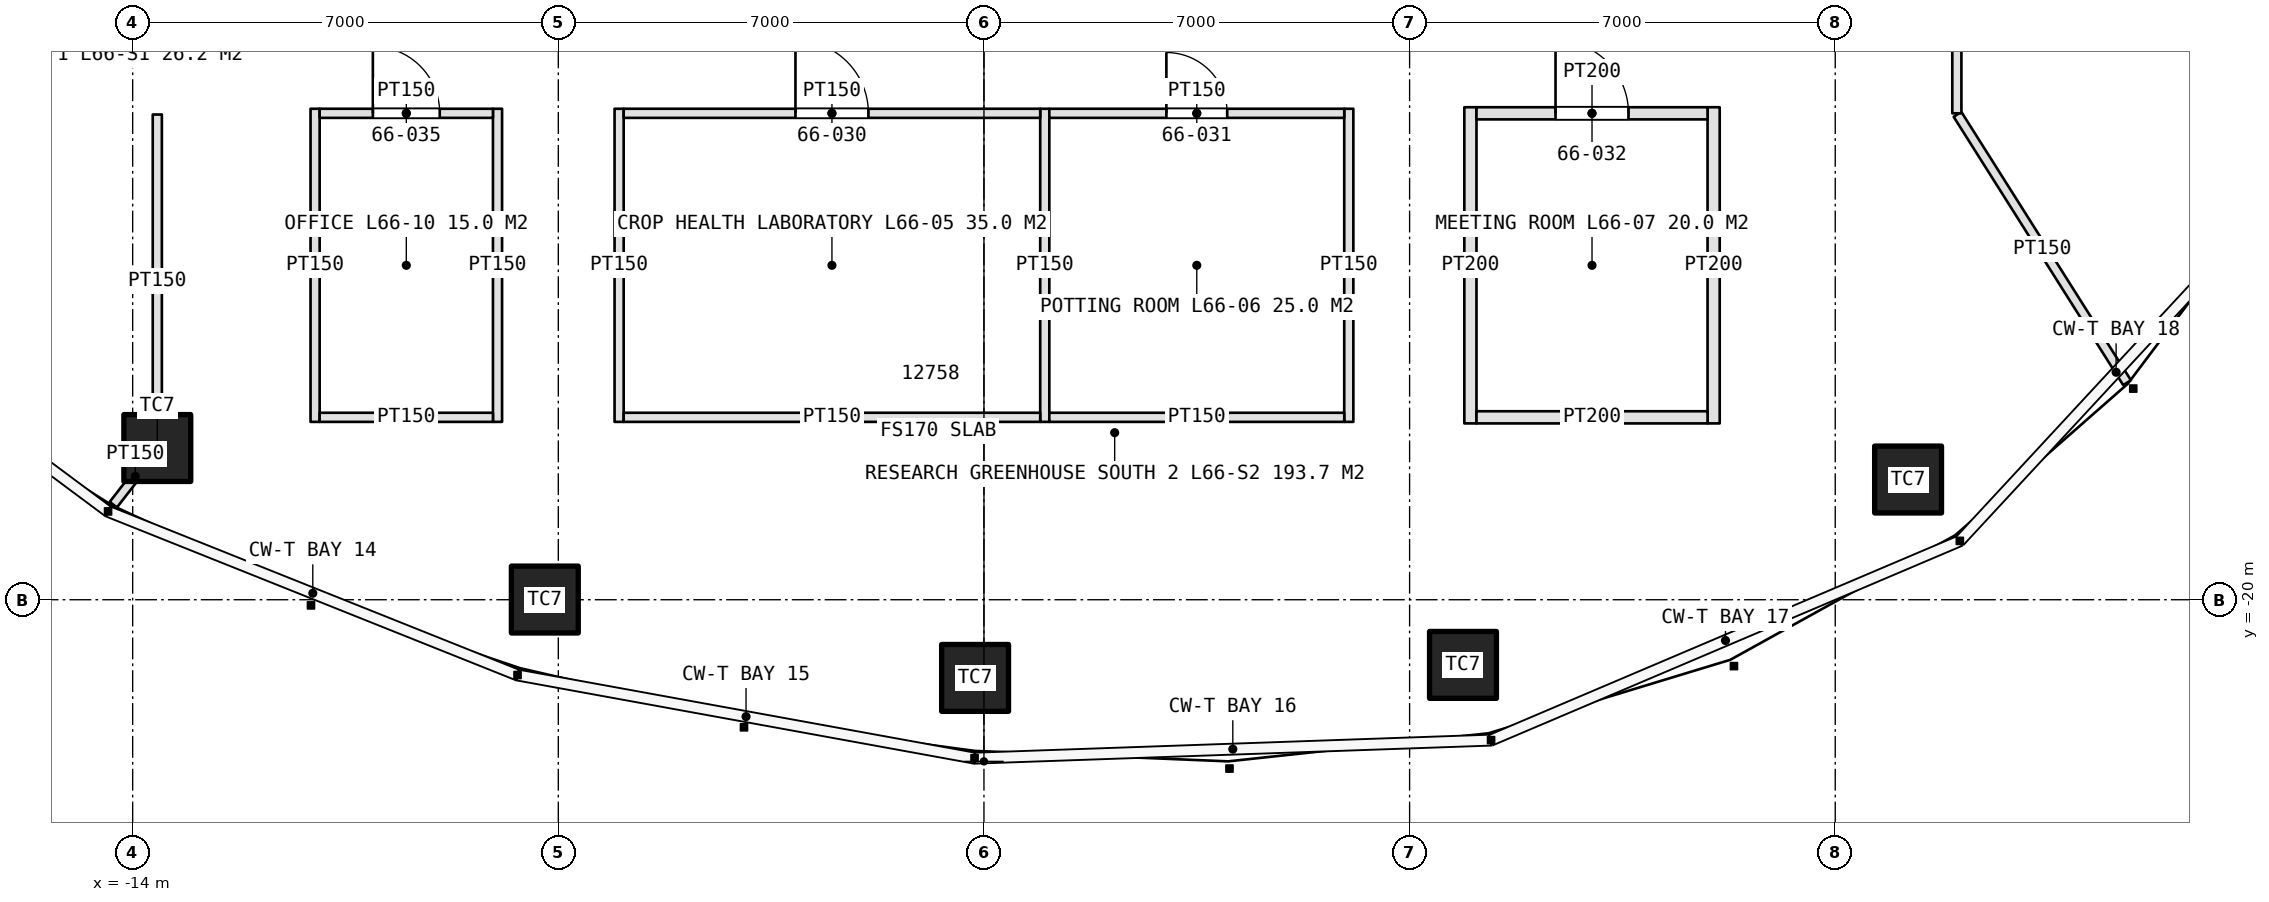
"""IFC4 building model, lengths in metres.
Left out: names, types, materials, properties, quantities, classifications, styles, units other than length and angle.
Written with IfcOpenShell. Run it as: python <this file> out.ifc"""

import sys

from ifc_helpers import new_model, si_unit, direction, frame, frame_2d, origin, origin_2d, place, context, subcontext, project, spatial, rectangle, extrude, element, fill, save


model = new_model("IFC4")
c1 = context("Model", 3, precision=1e-05, world=origin(), true_north=direction((0.0, 1.0)))
c2 = subcontext(c1, "Body", "Model", "MODEL_VIEW")
j1 = project(units=[si_unit("LENGTHUNIT", "METRE"), si_unit("PLANEANGLEUNIT", "RADIAN")], contexts=[c1])
p1 = place(None, origin())
s1 = spatial("IfcSite", under=j1, at=p1, CompositionType="ELEMENT")
p2 = place(p1, origin())
s2 = spatial("IfcBuilding", under=s1, at=p2, CompositionType="ELEMENT")
p3 = place(p2, frame((0.0, 0.0, 296.4)))
s3 = spatial("IfcBuildingStorey", under=s2, at=p3, CompositionType="ELEMENT", Elevation=296.4)
for number, where, z_axis, x_axis in (
    (1, (-13.595, -17.505, 0.0), (0.0, 0.0, 1.0), (1.0, 0.0, 0.0)),
    (2, (-7.222, -19.997, 0.0), (0.0, 0.0, 1.0), (1.0, 0.0, 0.0)),
    (3, (-0.146, -21.286, 0.0), (0.0, 0.0, 1.0), (1.0, 0.0, 0.0)),
    (4, (7.878, -21.072, 0.0), (0.0, 0.0, 1.0), (1.0, 0.0, 0.0)),
    (5, (15.198, -18.023, 0.0), (0.0, 0.0, 1.0), (1.0, 0.0, 0.0)),
):
    element("IfcColumn", number, at=place(p3, frame(where, z_axis=z_axis, x_axis=x_axis)), inside=s3, PredefinedType="COLUMN", context=c2, shape_type="SweptSolid", body=[
        extrude(rectangle(XDim=1.1, YDim=1.1, at=origin_2d()), origin(), (0.0, 0.0, 1.0), 4.2),
    ])
for number, where, z_axis, x_axis in (
    (6, (-6.0, -11.925, 0.0), (0.0, 0.0, 1.0), (0.0, -1.0, 0.0)),
    (7, (1.0, -11.925, 0.0), (0.0, 0.0, 1.0), (0.0, -1.0, 0.0)),
    (8, (6.0, -11.925, 0.0), (0.0, 0.0, 1.0), (0.0, -1.0, 0.0)),
):
    element("IfcWall", number, at=place(p3, frame(where, z_axis=z_axis, x_axis=x_axis)), inside=s3, PredefinedType="PARTITIONING", context=c2, shape_type="SweptSolid", body=[
        extrude(rectangle(XDim=5.15, YDim=0.15, at=frame_2d((2.575, 0.0))), origin(), (0.0, 0.0, 1.0), 3.0),
    ])
p4 = place(p3, frame((-5.925, -12.0, 0.0), z_axis=(0.0, 0.0, 1.0), x_axis=(1.0, 0.0, 0.0)))
e9 = element("IfcWall", 9, at=p4, inside=s3, PredefinedType="PARTITIONING", context=c2, shape_type="SweptSolid", body=[
    extrude(rectangle(XDim=6.85, YDim=0.15, at=frame_2d((3.425, 0.0))), origin(), (0.0, 0.0, 1.0), 3.0),
])
p5 = place(p4, frame((2.825, 0.0, 0.0)))
e10 = element("IfcOpeningElement", 10, at=p5, cuts=e9, PredefinedType="OPENING", context=c2, shape_type="SweptSolid", body=[
    extrude(rectangle(XDim=1.2, YDim=2.3, at=frame_2d((0.6, 1.15))), frame((0.0, 0.085, 0.0), z_axis=(0.0, -1.0, 0.0), x_axis=(1.0, 0.0, 0.0)), (0.0, 0.0, 1.0), 0.17),
])
p6 = place(p3, frame((-5.925, -17.0, 0.0), z_axis=(0.0, 0.0, 1.0), x_axis=(1.0, 0.0, 0.0)))
e11 = element("IfcWall", 11, at=p6, inside=s3, PredefinedType="PARTITIONING", context=c2, shape_type="SweptSolid", body=[
    extrude(rectangle(XDim=6.85, YDim=0.15, at=frame_2d((3.425, 0.0))), origin(), (0.0, 0.0, 1.0), 3.0),
])
p7 = place(p3, frame((1.075, -12.0, 0.0), z_axis=(0.0, 0.0, 1.0), x_axis=(1.0, 0.0, 0.0)))
e12 = element("IfcWall", 12, at=p7, inside=s3, PredefinedType="PARTITIONING", context=c2, shape_type="SweptSolid", body=[
    extrude(rectangle(XDim=4.85, YDim=0.15, at=frame_2d((2.425, 0.0))), origin(), (0.0, 0.0, 1.0), 3.0),
])
p8 = place(p7, frame((1.925, 0.0, 0.0)))
e13 = element("IfcOpeningElement", 13, at=p8, cuts=e12, PredefinedType="OPENING", context=c2, shape_type="SweptSolid", body=[
    extrude(rectangle(XDim=1.0, YDim=2.2, at=frame_2d((0.5, 1.1))), frame((0.0, 0.085, 0.0), z_axis=(0.0, -1.0, 0.0), x_axis=(1.0, 0.0, 0.0)), (0.0, 0.0, 1.0), 0.17),
])
p9 = place(p3, frame((1.075, -17.0, 0.0), z_axis=(0.0, 0.0, 1.0), x_axis=(1.0, 0.0, 0.0)))
e14 = element("IfcWall", 14, at=p9, inside=s3, PredefinedType="PARTITIONING", context=c2, shape_type="SweptSolid", body=[
    extrude(rectangle(XDim=4.85, YDim=0.15, at=frame_2d((2.425, 0.0))), origin(), (0.0, 0.0, 1.0), 3.0),
])
for number, where, z_axis, x_axis in (
    (15, (8.0, -11.9, 0.0), (0.0, 0.0, 1.0), (0.0, -1.0, 0.0)),
    (16, (12.0, -11.9, 0.0), (0.0, 0.0, 1.0), (0.0, -1.0, 0.0)),
):
    element("IfcWall", number, at=place(p3, frame(where, z_axis=z_axis, x_axis=x_axis)), inside=s3, PredefinedType="PARTITIONING", context=c2, shape_type="SweptSolid", body=[
        extrude(rectangle(XDim=5.2, YDim=0.2, at=frame_2d((2.6, 0.0))), origin(), (0.0, 0.0, 1.0), 3.0),
    ])
p10 = place(p3, frame((8.1, -12.0, 0.0), z_axis=(0.0, 0.0, 1.0), x_axis=(1.0, 0.0, 0.0)))
e17 = element("IfcWall", 17, at=p10, inside=s3, PredefinedType="PARTITIONING", context=c2, shape_type="SweptSolid", body=[
    extrude(rectangle(XDim=3.8, YDim=0.2, at=frame_2d((1.9, 0.0))), origin(), (0.0, 0.0, 1.0), 3.0),
])
p11 = place(p10, frame((1.3, 0.0, 0.0)))
e18 = element("IfcOpeningElement", 18, at=p11, cuts=e17, PredefinedType="OPENING", context=c2, shape_type="SweptSolid", body=[
    extrude(rectangle(XDim=1.2, YDim=2.4, at=frame_2d((0.6, 1.2))), frame((0.0, 0.11, 0.0), z_axis=(0.0, -1.0, 0.0), x_axis=(1.0, 0.0, 0.0)), (0.0, 0.0, 1.0), 0.22),
])
p12 = place(p3, frame((8.1, -17.0, 0.0), z_axis=(0.0, 0.0, 1.0), x_axis=(1.0, 0.0, 0.0)))
e19 = element("IfcWall", 19, at=p12, inside=s3, PredefinedType="PARTITIONING", context=c2, shape_type="SweptSolid", body=[
    extrude(rectangle(XDim=3.8, YDim=0.2, at=frame_2d((1.9, 0.0))), origin(), (0.0, 0.0, 1.0), 3.0),
])
for number, where, z_axis, x_axis in (
    (20, (-11.0, -11.925, 0.0), (0.0, 0.0, 1.0), (0.0, -1.0, 0.0)),
    (21, (-8.0, -11.925, 0.0), (0.0, 0.0, 1.0), (0.0, -1.0, 0.0)),
):
    element("IfcWall", number, at=place(p3, frame(where, z_axis=z_axis, x_axis=x_axis)), inside=s3, PredefinedType="PARTITIONING", context=c2, shape_type="SweptSolid", body=[
        extrude(rectangle(XDim=5.15, YDim=0.15, at=frame_2d((2.575, 0.0))), origin(), (0.0, 0.0, 1.0), 3.0),
    ])
p13 = place(p3, frame((-10.925, -12.0, 0.0), z_axis=(0.0, 0.0, 1.0), x_axis=(1.0, 0.0, 0.0)))
e22 = element("IfcWall", 22, at=p13, inside=s3, PredefinedType="PARTITIONING", context=c2, shape_type="SweptSolid", body=[
    extrude(rectangle(XDim=2.85, YDim=0.15, at=frame_2d((1.425, 0.0))), origin(), (0.0, 0.0, 1.0), 3.0),
])
p14 = place(p13, frame((0.875, 0.0, 0.0)))
e23 = element("IfcOpeningElement", 23, at=p14, cuts=e22, PredefinedType="OPENING", context=c2, shape_type="SweptSolid", body=[
    extrude(rectangle(XDim=1.1, YDim=2.3, at=frame_2d((0.55, 1.15))), frame((0.0, 0.085, 0.0), z_axis=(0.0, -1.0, 0.0), x_axis=(1.0, 0.0, 0.0)), (0.0, 0.0, 1.0), 0.17),
])
p15 = place(p3, frame((-10.925, -17.0, 0.0), z_axis=(0.0, 0.0, 1.0), x_axis=(1.0, 0.0, 0.0)))
e24 = element("IfcWall", 24, at=p15, inside=s3, PredefinedType="PARTITIONING", context=c2, shape_type="SweptSolid", body=[
    extrude(rectangle(XDim=2.85, YDim=0.15, at=frame_2d((1.425, 0.0))), origin(), (0.0, 0.0, 1.0), 3.0),
])
p16 = place(p3, frame((16.011, -12.017, 0.0), z_axis=(0.0, 0.0, 1.0), x_axis=(0.53415837449, -0.845384427916, 0.0)))
e25 = element("IfcWall", 25, at=p16, inside=s3, PredefinedType="PARTITIONING", context=c2, shape_type="SweptSolid", body=[
    extrude(rectangle(XDim=5.22, YDim=0.15, at=frame_2d((2.61, 0.0))), origin(), (0.0, 0.0, 1.0), 3.0),
])
p17 = place(p3, frame((-13.595, -12.02, 0.0), z_axis=(0.0, 0.0, 1.0), x_axis=(0.0, -1.0, 0.0)))
e26 = element("IfcWall", 26, at=p17, inside=s3, PredefinedType="PARTITIONING", context=c2, shape_type="SweptSolid", body=[
    extrude(rectangle(XDim=5.485, YDim=0.15, at=frame_2d((2.742, 0.0))), origin(), (0.0, 0.0, 1.0), 3.0),
])
p18 = place(p3, frame((-13.595, -17.505, 0.0), z_axis=(0.0, 0.0, 1.0), x_axis=(-0.61332442804, -0.789831086986, 0.0)))
e27 = element("IfcWall", 27, at=p18, inside=s3, PredefinedType="PARTITIONING", context=c2, shape_type="SweptSolid", body=[
    extrude(rectangle(XDim=1.18, YDim=0.15, at=frame_2d((0.59, 0.0))), origin(), (0.0, 0.0, 1.0), 3.0),
])
p19 = place(p3, frame((16.0, -12.0, 0.0), z_axis=(0.0, 0.0, 1.0), x_axis=(0.0, 1.0, 0.0)))
e28 = element("IfcWall", 28, at=p19, inside=s3, PredefinedType="PARTITIONING", context=c2, shape_type="SweptSolid", body=[
    extrude(rectangle(XDim=8.0, YDim=0.15, at=frame_2d((4.0, 0.0))), origin(), (0.0, 0.0, 1.0), 3.0),
])
p20 = place(p19, frame((5.9, 0.0, 0.0)))
e29 = element("IfcOpeningElement", 29, at=p20, cuts=e28, PredefinedType="OPENING", context=c2, shape_type="SweptSolid", body=[
    extrude(rectangle(XDim=1.6, YDim=2.4, at=frame_2d((0.8, 1.2))), frame((0.0, 0.085, 0.0), z_axis=(0.0, -1.0, 0.0), x_axis=(1.0, 0.0, 0.0)), (0.0, 0.0, 1.0), 0.17),
])
p21 = place(p5, origin())
e30 = element("IfcDoor", 30, at=p21, inside=s3, OperationType="SINGLE_SWING_LEFT", PredefinedType="DOOR", context=c2, shape_type="SweptSolid", body=[
    extrude(rectangle(XDim=1.2, YDim=2.3, at=frame_2d((0.6, 1.15))), frame((0.0, 0.025, 0.0), z_axis=(0.0, -1.0, 0.0), x_axis=(1.0, 0.0, 0.0)), (0.0, 0.0, 1.0), 0.05),
])
fill(e10, e30)
p22 = place(p8, origin())
e31 = element("IfcDoor", 31, at=p22, inside=s3, OperationType="SINGLE_SWING_LEFT", PredefinedType="DOOR", context=c2, shape_type="SweptSolid", body=[
    extrude(rectangle(XDim=1.0, YDim=2.2, at=frame_2d((0.5, 1.1))), frame((0.0, 0.025, 0.0), z_axis=(0.0, -1.0, 0.0), x_axis=(1.0, 0.0, 0.0)), (0.0, 0.0, 1.0), 0.05),
])
fill(e13, e31)
p23 = place(p11, origin())
e32 = element("IfcDoor", 32, at=p23, inside=s3, OperationType="SINGLE_SWING_LEFT", PredefinedType="DOOR", context=c2, shape_type="SweptSolid", body=[
    extrude(rectangle(XDim=1.2, YDim=2.4, at=frame_2d((0.6, 1.2))), frame((0.0, 0.025, 0.0), z_axis=(0.0, -1.0, 0.0), x_axis=(1.0, 0.0, 0.0)), (0.0, 0.0, 1.0), 0.05),
])
fill(e18, e32)
p24 = place(p14, origin())
e33 = element("IfcDoor", 33, at=p24, inside=s3, OperationType="SINGLE_SWING_LEFT", PredefinedType="DOOR", context=c2, shape_type="SweptSolid", body=[
    extrude(rectangle(XDim=1.1, YDim=2.3, at=frame_2d((0.55, 1.15))), frame((0.0, 0.025, 0.0), z_axis=(0.0, -1.0, 0.0), x_axis=(1.0, 0.0, 0.0)), (0.0, 0.0, 1.0), 0.05),
])
fill(e23, e33)
save(model, sys.argv[1])
